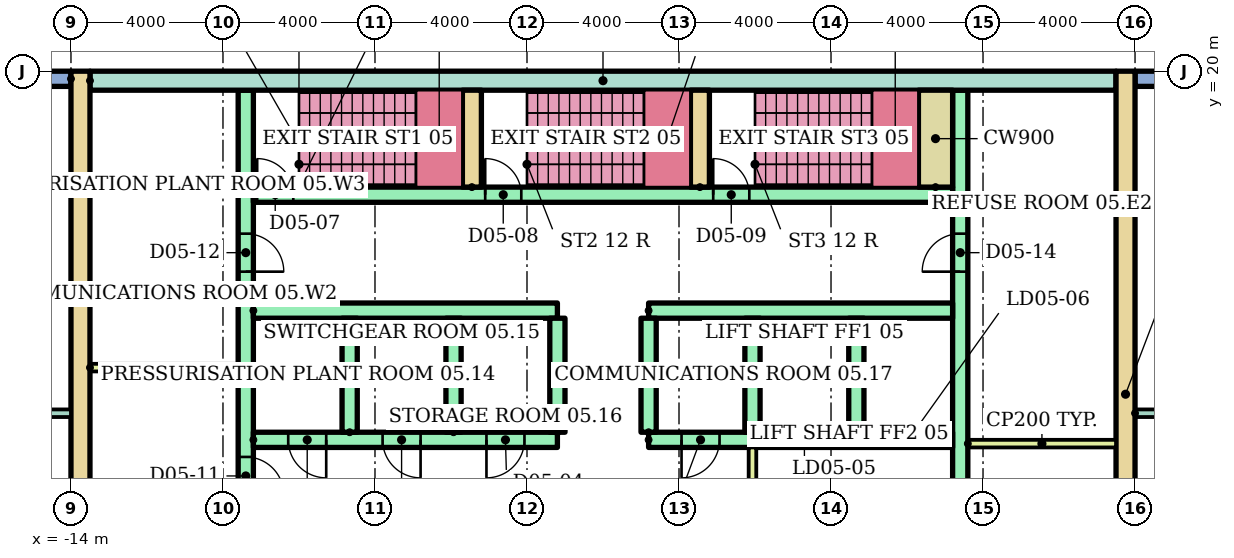
"""IFC4 building model, lengths in metres.
Left out: names, types, materials, properties, quantities, classifications, styles, units other than length and angle.
Written with IfcOpenShell. Run it as: python <this file> out.ifc"""

import sys

from ifc_helpers import new_model, si_unit, direction, frame, frame_2d, origin, place, context, subcontext, project, spatial, rectangle, extrude, element, fill, save


model = new_model("IFC4")
c1 = context("Model", 3, precision=1e-05, world=origin(), true_north=direction((0.0, 1.0)))
c2 = subcontext(c1, "Body", "Model", "MODEL_VIEW")
j1 = project(units=[si_unit("LENGTHUNIT", "METRE"), si_unit("PLANEANGLEUNIT", "RADIAN")], contexts=[c1])
p1 = place(None, origin())
s1 = spatial("IfcSite", under=j1, at=p1, CompositionType="ELEMENT")
p2 = place(p1, origin())
s2 = spatial("IfcBuilding", under=s1, at=p2, CompositionType="ELEMENT")
p3 = place(p2, frame((0.0, 0.0, 22.0)))
s3 = spatial("IfcBuildingStorey", under=s2, at=p3, CompositionType="ELEMENT", Elevation=22.0)
p4 = place(p3, frame((39.6, 19.8, 0.0), z_axis=(0.0, 0.0, 1.0), x_axis=(-1.0, 0.0, 0.0)))
e1 = element("IfcWall", 1, at=p4, inside=s3, PredefinedType="STANDARD", context=c2, shape_type="SweptSolid", body=[
    extrude(rectangle(XDim=25.6, YDim=0.4, at=frame_2d((12.8, 0.0))), origin(), (0.0, 0.0, 1.0), 3.7),
])
p5 = place(p4, frame((2.4, 0.0, 0.9)))
e2 = element("IfcOpeningElement", 2, at=p5, cuts=e1, PredefinedType="OPENING", context=c2, shape_type="SweptSolid", body=[
    extrude(rectangle(XDim=2.4, YDim=2.1, at=frame_2d((1.2, 1.05))), frame((0.0, 0.21, 0.0), z_axis=(0.0, -1.0, 0.0), x_axis=(1.0, 0.0, 0.0)), (0.0, 0.0, 1.0), 0.42),
])
p6 = place(p4, frame((18.135, 0.0, 0.9)))
e3 = element("IfcOpeningElement", 3, at=p6, cuts=e1, PredefinedType="OPENING", context=c2, shape_type="SweptSolid", body=[
    extrude(rectangle(XDim=2.4, YDim=2.1, at=frame_2d((1.2, 1.05))), frame((0.0, 0.21, 0.0), z_axis=(0.0, -1.0, 0.0), x_axis=(1.0, 0.0, 0.0)), (0.0, 0.0, 1.0), 0.42),
])
p7 = place(p4, frame((22.665, 0.0, 0.9)))
e4 = element("IfcOpeningElement", 4, at=p7, cuts=e1, PredefinedType="OPENING", context=c2, shape_type="SweptSolid", body=[
    extrude(rectangle(XDim=2.4, YDim=2.1, at=frame_2d((1.2, 1.05))), frame((0.0, 0.21, 0.0), z_axis=(0.0, -1.0, 0.0), x_axis=(1.0, 0.0, 0.0)), (0.0, 0.0, 1.0), 0.42),
])
p8 = place(p3, frame((-14.0, 19.8, 0.0), z_axis=(0.0, 0.0, 1.0), x_axis=(-1.0, 0.0, 0.0)))
e5 = element("IfcWall", 5, at=p8, inside=s3, PredefinedType="STANDARD", context=c2, shape_type="SweptSolid", body=[
    extrude(rectangle(XDim=25.6, YDim=0.4, at=frame_2d((12.8, 0.0))), origin(), (0.0, 0.0, 1.0), 3.7),
])
p9 = place(p8, frame((0.8, 0.0, 0.9)))
e6 = element("IfcOpeningElement", 6, at=p9, cuts=e5, PredefinedType="OPENING", context=c2, shape_type="SweptSolid", body=[
    extrude(rectangle(XDim=2.4, YDim=2.1, at=frame_2d((1.2, 1.05))), frame((0.0, 0.21, 0.0), z_axis=(0.0, -1.0, 0.0), x_axis=(1.0, 0.0, 0.0)), (0.0, 0.0, 1.0), 0.42),
])
p10 = place(p8, frame((4.535, 0.0, 0.9)))
e7 = element("IfcOpeningElement", 7, at=p10, cuts=e5, PredefinedType="OPENING", context=c2, shape_type="SweptSolid", body=[
    extrude(rectangle(XDim=2.4, YDim=2.1, at=frame_2d((1.2, 1.05))), frame((0.0, 0.21, 0.0), z_axis=(0.0, -1.0, 0.0), x_axis=(1.0, 0.0, 0.0)), (0.0, 0.0, 1.0), 0.42),
])
p11 = place(p8, frame((12.535, 0.0, 0.9)))
e8 = element("IfcOpeningElement", 8, at=p11, cuts=e5, PredefinedType="OPENING", context=c2, shape_type="SweptSolid", body=[
    extrude(rectangle(XDim=2.4, YDim=2.1, at=frame_2d((1.2, 1.05))), frame((0.0, 0.21, 0.0), z_axis=(0.0, -1.0, 0.0), x_axis=(1.0, 0.0, 0.0)), (0.0, 0.0, 1.0), 0.42),
])
p12 = place(p8, frame((20.8, 0.0, 0.9)))
e9 = element("IfcOpeningElement", 9, at=p12, cuts=e5, PredefinedType="OPENING", context=c2, shape_type="SweptSolid", body=[
    extrude(rectangle(XDim=2.4, YDim=2.1, at=frame_2d((1.2, 1.05))), frame((0.0, 0.21, 0.0), z_axis=(0.0, -1.0, 0.0), x_axis=(1.0, 0.0, 0.0)), (0.0, 0.0, 1.0), 0.42),
])
for number, where, z_axis, x_axis in (
    (10, (-13.75, 3.0, 0.0), (0.0, 0.0, 1.0), (0.0, 1.0, 0.0)),
    (11, (13.75, 3.0, 0.0), (0.0, 0.0, 1.0), (0.0, 1.0, 0.0)),
):
    element("IfcWall", number, at=place(p3, frame(where, z_axis=z_axis, x_axis=x_axis)), inside=s3, PredefinedType="SHEAR", context=c2, shape_type="SweptSolid", body=[
        extrude(rectangle(XDim=17.0, YDim=0.5, at=frame_2d((8.5, 0.0))), origin(), (0.0, 0.0, 1.0), 3.2),
    ])
p13 = place(p3, frame((-13.5, 19.75, 0.0)))
e12 = element("IfcWall", 12, at=p13, inside=s3, PredefinedType="SHEAR", context=c2, shape_type="SweptSolid", body=[
    extrude(rectangle(XDim=27.0, YDim=0.5, at=frame_2d((13.5, 0.0))), origin(), (0.0, 0.0, 1.0), 3.2),
])
p14 = place(p3, frame((-9.4, 6.8, 0.0), z_axis=(0.0, 0.0, 1.0), x_axis=(0.0, 1.0, 0.0)))
e13 = element("IfcWall", 13, at=p14, inside=s3, PredefinedType="SHEAR", context=c2, shape_type="SweptSolid", body=[
    extrude(rectangle(XDim=12.7, YDim=0.4, at=frame_2d((6.35, 0.0))), origin(), (0.0, 0.0, 1.0), 3.2),
])
p15 = place(p14, frame((0.3, 0.0, 0.0)))
e14 = element("IfcOpeningElement", 14, at=p15, cuts=e13, PredefinedType="OPENING", context=c2, shape_type="SweptSolid", body=[
    extrude(rectangle(XDim=1.0, YDim=2.1, at=frame_2d((0.5, 1.05))), frame((0.0, 0.21, 0.0), z_axis=(0.0, -1.0, 0.0), x_axis=(1.0, 0.0, 0.0)), (0.0, 0.0, 1.0), 0.42),
])
p16 = place(p14, frame((2.05, 0.0, 0.0)))
e15 = element("IfcOpeningElement", 15, at=p16, cuts=e13, PredefinedType="OPENING", context=c2, shape_type="SweptSolid", body=[
    extrude(rectangle(XDim=1.0, YDim=2.1, at=frame_2d((0.5, 1.05))), frame((0.0, 0.21, 0.0), z_axis=(0.0, -1.0, 0.0), x_axis=(1.0, 0.0, 0.0)), (0.0, 0.0, 1.0), 0.42),
])
p17 = place(p14, frame((7.925, 0.0, 0.0)))
e16 = element("IfcOpeningElement", 16, at=p17, cuts=e13, PredefinedType="OPENING", context=c2, shape_type="SweptSolid", body=[
    extrude(rectangle(XDim=1.0, YDim=2.1, at=frame_2d((0.5, 1.05))), frame((0.0, 0.21, 0.0), z_axis=(0.0, -1.0, 0.0), x_axis=(1.0, 0.0, 0.0)), (0.0, 0.0, 1.0), 0.42),
])
p18 = place(p3, frame((9.4, 6.8, 0.0), z_axis=(0.0, 0.0, 1.0), x_axis=(0.0, 1.0, 0.0)))
e17 = element("IfcWall", 17, at=p18, inside=s3, PredefinedType="SHEAR", context=c2, shape_type="SweptSolid", body=[
    extrude(rectangle(XDim=12.7, YDim=0.4, at=frame_2d((6.35, 0.0))), origin(), (0.0, 0.0, 1.0), 3.2),
])
p19 = place(p18, frame((1.15, 0.0, 0.0)))
e18 = element("IfcOpeningElement", 18, at=p19, cuts=e17, PredefinedType="OPENING", context=c2, shape_type="SweptSolid", body=[
    extrude(rectangle(XDim=1.0, YDim=2.1, at=frame_2d((0.5, 1.05))), frame((0.0, 0.21, 0.0), z_axis=(0.0, -1.0, 0.0), x_axis=(1.0, 0.0, 0.0)), (0.0, 0.0, 1.0), 0.42),
])
p20 = place(p18, frame((7.925, 0.0, 0.0)))
e19 = element("IfcOpeningElement", 19, at=p20, cuts=e17, PredefinedType="OPENING", context=c2, shape_type="SweptSolid", body=[
    extrude(rectangle(XDim=1.0, YDim=2.1, at=frame_2d((0.5, 1.05))), frame((0.0, 0.21, 0.0), z_axis=(0.0, -1.0, 0.0), x_axis=(1.0, 0.0, 0.0)), (0.0, 0.0, 1.0), 0.42),
])
p21 = place(p3, frame((-9.2, 10.3, 0.0)))
e20 = element("IfcWall", 20, at=p21, inside=s3, PredefinedType="SHEAR", context=c2, shape_type="SweptSolid", body=[
    extrude(rectangle(XDim=8.0, YDim=0.4, at=frame_2d((4.0, 0.0))), origin(), (0.0, 0.0, 1.0), 3.2),
])
p22 = place(p21, frame((0.917, 0.0, 0.0)))
e21 = element("IfcOpeningElement", 21, at=p22, cuts=e20, PredefinedType="OPENING", context=c2, shape_type="SweptSolid", body=[
    extrude(rectangle(XDim=1.0, YDim=2.1, at=frame_2d((0.5, 1.05))), frame((0.0, 0.21, 0.0), z_axis=(0.0, -1.0, 0.0), x_axis=(1.0, 0.0, 0.0)), (0.0, 0.0, 1.0), 0.42),
])
p23 = place(p21, frame((3.4, 0.0, 0.0)))
e22 = element("IfcOpeningElement", 22, at=p23, cuts=e20, PredefinedType="OPENING", context=c2, shape_type="SweptSolid", body=[
    extrude(rectangle(XDim=1.0, YDim=2.1, at=frame_2d((0.5, 1.05))), frame((0.0, 0.21, 0.0), z_axis=(0.0, -1.0, 0.0), x_axis=(1.0, 0.0, 0.0)), (0.0, 0.0, 1.0), 0.42),
])
p24 = place(p21, frame((6.133, 0.0, 0.0)))
e23 = element("IfcOpeningElement", 23, at=p24, cuts=e20, PredefinedType="OPENING", context=c2, shape_type="SweptSolid", body=[
    extrude(rectangle(XDim=1.0, YDim=2.1, at=frame_2d((0.5, 1.05))), frame((0.0, 0.21, 0.0), z_axis=(0.0, -1.0, 0.0), x_axis=(1.0, 0.0, 0.0)), (0.0, 0.0, 1.0), 0.42),
])
p25 = place(p3, frame((-9.2, 13.7, 0.0)))
e24 = element("IfcWall", 24, at=p25, inside=s3, PredefinedType="SHEAR", context=c2, shape_type="SweptSolid", body=[
    extrude(rectangle(XDim=8.0, YDim=0.4, at=frame_2d((4.0, 0.0))), origin(), (0.0, 0.0, 1.0), 3.2),
])
p26 = place(p3, frame((1.2, 10.3, 0.0)))
e25 = element("IfcWall", 25, at=p26, inside=s3, PredefinedType="SHEAR", context=c2, shape_type="SweptSolid", body=[
    extrude(rectangle(XDim=8.0, YDim=0.4, at=frame_2d((4.0, 0.0))), origin(), (0.0, 0.0, 1.0), 3.2),
])
p27 = place(p26, frame((3.55, 0.0, 0.0)))
e26 = element("IfcOpeningElement", 26, at=p27, cuts=e25, PredefinedType="OPENING", context=c2, shape_type="SweptSolid", body=[
    extrude(rectangle(XDim=1.1, YDim=2.1, at=frame_2d((0.55, 1.05))), frame((0.0, 0.21, 0.0), z_axis=(0.0, -1.0, 0.0), x_axis=(1.0, 0.0, 0.0)), (0.0, 0.0, 1.0), 0.42),
])
p28 = place(p26, frame((6.283, 0.0, 0.0)))
e27 = element("IfcOpeningElement", 27, at=p28, cuts=e25, PredefinedType="OPENING", context=c2, shape_type="SweptSolid", body=[
    extrude(rectangle(XDim=1.1, YDim=2.1, at=frame_2d((0.55, 1.05))), frame((0.0, 0.21, 0.0), z_axis=(0.0, -1.0, 0.0), x_axis=(1.0, 0.0, 0.0)), (0.0, 0.0, 1.0), 0.42),
])
p29 = place(p26, frame((0.867, 0.0, 0.0)))
e28 = element("IfcOpeningElement", 28, at=p29, cuts=e25, PredefinedType="OPENING", context=c2, shape_type="SweptSolid", body=[
    extrude(rectangle(XDim=1.0, YDim=2.1, at=frame_2d((0.5, 1.05))), frame((0.0, 0.21, 0.0), z_axis=(0.0, -1.0, 0.0), x_axis=(1.0, 0.0, 0.0)), (0.0, 0.0, 1.0), 0.42),
])
p30 = place(p3, frame((1.2, 13.7, 0.0)))
e29 = element("IfcWall", 29, at=p30, inside=s3, PredefinedType="SHEAR", context=c2, shape_type="SweptSolid", body=[
    extrude(rectangle(XDim=8.0, YDim=0.4, at=frame_2d((4.0, 0.0))), origin(), (0.0, 0.0, 1.0), 3.2),
])
for number, where, z_axis, x_axis in (
    (30, (-6.667, 10.5, 0.0), (0.0, 0.0, 1.0), (0.0, 1.0, 0.0)),
    (31, (-3.933, 10.5, 0.0), (0.0, 0.0, 1.0), (0.0, 1.0, 0.0)),
    (32, (-1.2, 10.5, 0.0), (0.0, 0.0, 1.0), (0.0, 1.0, 0.0)),
    (33, (1.2, 10.5, 0.0), (0.0, 0.0, 1.0), (0.0, 1.0, 0.0)),
    (34, (3.933, 10.5, 0.0), (0.0, 0.0, 1.0), (0.0, 1.0, 0.0)),
    (35, (6.667, 10.5, 0.0), (0.0, 0.0, 1.0), (0.0, 1.0, 0.0)),
):
    element("IfcWall", number, at=place(p3, frame(where, z_axis=z_axis, x_axis=x_axis)), inside=s3, PredefinedType="SHEAR", context=c2, shape_type="SweptSolid", body=[
        extrude(rectangle(XDim=3.0, YDim=0.4, at=frame_2d((1.5, 0.0))), origin(), (0.0, 0.0, 1.0), 3.2),
    ])
p31 = place(p3, frame((3.933, 6.8, 0.0), z_axis=(0.0, 0.0, 1.0), x_axis=(0.0, 1.0, 0.0)))
e36 = element("IfcWall", 36, at=p31, inside=s3, PredefinedType="PARTITIONING", context=c2, shape_type="SweptSolid", body=[
    extrude(rectangle(XDim=3.3, YDim=0.2, at=frame_2d((1.65, 0.0))), origin(), (0.0, 0.0, 1.0), 3.2),
])
p32 = place(p31, frame((1.1, 0.0, 0.0)))
e37 = element("IfcOpeningElement", 37, at=p32, cuts=e36, PredefinedType="OPENING", context=c2, shape_type="SweptSolid", body=[
    extrude(rectangle(XDim=1.1, YDim=2.1, at=frame_2d((0.55, 1.05))), frame((0.0, 0.11, 0.0), z_axis=(0.0, -1.0, 0.0), x_axis=(1.0, 0.0, 0.0)), (0.0, 0.0, 1.0), 0.22),
])
p33 = place(p3, frame((-9.2, 16.75, 0.0)))
e38 = element("IfcWall", 38, at=p33, inside=s3, PredefinedType="SHEAR", context=c2, shape_type="SweptSolid", body=[
    extrude(rectangle(XDim=18.4, YDim=0.4, at=frame_2d((9.2, 0.0))), origin(), (0.0, 0.0, 1.0), 3.2),
])
p34 = place(p33, frame((0.1, 0.0, 0.0)))
e39 = element("IfcOpeningElement", 39, at=p34, cuts=e38, PredefinedType="OPENING", context=c2, shape_type="SweptSolid", body=[
    extrude(rectangle(XDim=0.95, YDim=2.1, at=frame_2d((0.475, 1.05))), frame((0.0, 0.21, 0.0), z_axis=(0.0, -1.0, 0.0), x_axis=(1.0, 0.0, 0.0)), (0.0, 0.0, 1.0), 0.42),
])
p35 = place(p33, frame((6.1, 0.0, 0.0)))
e40 = element("IfcOpeningElement", 40, at=p35, cuts=e38, PredefinedType="OPENING", context=c2, shape_type="SweptSolid", body=[
    extrude(rectangle(XDim=0.95, YDim=2.1, at=frame_2d((0.475, 1.05))), frame((0.0, 0.21, 0.0), z_axis=(0.0, -1.0, 0.0), x_axis=(1.0, 0.0, 0.0)), (0.0, 0.0, 1.0), 0.42),
])
p36 = place(p33, frame((12.1, 0.0, 0.0)))
e41 = element("IfcOpeningElement", 41, at=p36, cuts=e38, PredefinedType="OPENING", context=c2, shape_type="SweptSolid", body=[
    extrude(rectangle(XDim=0.95, YDim=2.1, at=frame_2d((0.475, 1.05))), frame((0.0, 0.21, 0.0), z_axis=(0.0, -1.0, 0.0), x_axis=(1.0, 0.0, 0.0)), (0.0, 0.0, 1.0), 0.42),
])
for number, where, z_axis, x_axis in (
    (42, (-3.45, 16.95, 0.0), (0.0, 0.0, 1.0), (0.0, 1.0, 0.0)),
    (43, (2.55, 16.95, 0.0), (0.0, 0.0, 1.0), (0.0, 1.0, 0.0)),
):
    element("IfcWall", number, at=place(p3, frame(where, z_axis=z_axis, x_axis=x_axis)), inside=s3, PredefinedType="SHEAR", context=c2, shape_type="SweptSolid", body=[
        extrude(rectangle(XDim=2.55, YDim=0.5, at=frame_2d((1.275, 0.0))), origin(), (0.0, 0.0, 1.0), 3.2),
    ])
p37 = place(p3, frame((8.75, 16.95, 0.0), z_axis=(0.0, 0.0, 1.0), x_axis=(0.0, 1.0, 0.0)))
e44 = element("IfcWall", 44, at=p37, inside=s3, PredefinedType="SHEAR", context=c2, shape_type="SweptSolid", body=[
    extrude(rectangle(XDim=2.55, YDim=0.9, at=frame_2d((1.275, 0.0))), origin(), (0.0, 0.0, 1.0), 3.2),
])
for number, where in (
    (45, (-13.5, 12.2, 0.0)),
    (46, (9.6, 10.2, 0.0)),
):
    element("IfcWall", number, at=place(p3, frame(where)), inside=s3, PredefinedType="PARTITIONING", context=c2, shape_type="SweptSolid", body=[
        extrude(rectangle(XDim=3.9, YDim=0.2, at=frame_2d((1.95, 0.0))), origin(), (0.0, 0.0, 1.0), 3.2),
    ])
p38 = place(p3, frame((-21.5, 11.0, 0.0)))
e47 = element("IfcWall", 47, at=p38, inside=s3, PredefinedType="PARTITIONING", context=c2, shape_type="SweptSolid", body=[
    extrude(rectangle(XDim=7.5, YDim=0.2, at=frame_2d((3.75, 0.0))), origin(), (0.0, 0.0, 1.0), 3.2),
])
p39 = place(p38, frame((0.35, 0.0, 0.0)))
e48 = element("IfcOpeningElement", 48, at=p39, cuts=e47, PredefinedType="OPENING", context=c2, shape_type="SweptSolid", body=[
    extrude(rectangle(XDim=1.0, YDim=2.1, at=frame_2d((0.5, 1.05))), frame((0.0, 0.11, 0.0), z_axis=(0.0, -1.0, 0.0), x_axis=(1.0, 0.0, 0.0)), (0.0, 0.0, 1.0), 0.22),
])
p40 = place(p38, frame((4.36, 0.0, 0.0)))
e49 = element("IfcOpeningElement", 49, at=p40, cuts=e47, PredefinedType="OPENING", context=c2, shape_type="SweptSolid", body=[
    extrude(rectangle(XDim=1.0, YDim=2.1, at=frame_2d((0.5, 1.05))), frame((0.0, 0.11, 0.0), z_axis=(0.0, -1.0, 0.0), x_axis=(1.0, 0.0, 0.0)), (0.0, 0.0, 1.0), 0.22),
])
p41 = place(p3, frame((14.0, 11.0, 0.0)))
e50 = element("IfcWall", 50, at=p41, inside=s3, PredefinedType="PARTITIONING", context=c2, shape_type="SweptSolid", body=[
    extrude(rectangle(XDim=3.5, YDim=0.2, at=frame_2d((1.75, 0.0))), origin(), (0.0, 0.0, 1.0), 3.2),
])
p42 = place(p27, origin())
e51 = element("IfcDoor", 51, at=p42, inside=s3, OperationType="SLIDING_TO_LEFT", PredefinedType="DOOR", context=c2, shape_type="SweptSolid", body=[
    extrude(rectangle(XDim=1.1, YDim=2.1, at=frame_2d((0.55, 1.05))), frame((0.0, 0.025, 0.0), z_axis=(0.0, -1.0, 0.0), x_axis=(1.0, 0.0, 0.0)), (0.0, 0.0, 1.0), 0.05),
])
fill(e26, e51)
p43 = place(p28, origin())
e52 = element("IfcDoor", 52, at=p43, inside=s3, OperationType="SLIDING_TO_LEFT", PredefinedType="DOOR", context=c2, shape_type="SweptSolid", body=[
    extrude(rectangle(XDim=1.1, YDim=2.1, at=frame_2d((0.55, 1.05))), frame((0.0, 0.025, 0.0), z_axis=(0.0, -1.0, 0.0), x_axis=(1.0, 0.0, 0.0)), (0.0, 0.0, 1.0), 0.05),
])
fill(e27, e52)
p44 = place(p22, frame((1.0, 0.0, 0.0), z_axis=(0.0, 0.0, 1.0), x_axis=(-1.0, 0.0, 0.0)))
e53 = element("IfcDoor", 53, at=p44, inside=s3, OperationType="SINGLE_SWING_RIGHT", PredefinedType="DOOR", context=c2, shape_type="SweptSolid", body=[
    extrude(rectangle(XDim=1.0, YDim=2.1, at=frame_2d((0.5, 1.05))), frame((0.0, 0.025, 0.0), z_axis=(0.0, -1.0, 0.0), x_axis=(1.0, 0.0, 0.0)), (0.0, 0.0, 1.0), 0.05),
])
fill(e21, e53)
p45 = place(p23, frame((1.0, 0.0, 0.0), z_axis=(0.0, 0.0, 1.0), x_axis=(-1.0, 0.0, 0.0)))
e54 = element("IfcDoor", 54, at=p45, inside=s3, OperationType="SINGLE_SWING_RIGHT", PredefinedType="DOOR", context=c2, shape_type="SweptSolid", body=[
    extrude(rectangle(XDim=1.0, YDim=2.1, at=frame_2d((0.5, 1.05))), frame((0.0, 0.025, 0.0), z_axis=(0.0, -1.0, 0.0), x_axis=(1.0, 0.0, 0.0)), (0.0, 0.0, 1.0), 0.05),
])
fill(e22, e54)
p46 = place(p24, frame((1.0, 0.0, 0.0), z_axis=(0.0, 0.0, 1.0), x_axis=(-1.0, 0.0, 0.0)))
e55 = element("IfcDoor", 55, at=p46, inside=s3, OperationType="SINGLE_SWING_LEFT", PredefinedType="DOOR", context=c2, shape_type="SweptSolid", body=[
    extrude(rectangle(XDim=1.0, YDim=2.1, at=frame_2d((0.5, 1.05))), frame((0.0, 0.025, 0.0), z_axis=(0.0, -1.0, 0.0), x_axis=(1.0, 0.0, 0.0)), (0.0, 0.0, 1.0), 0.05),
])
fill(e23, e55)
p47 = place(p29, frame((1.0, 0.0, 0.0), z_axis=(0.0, 0.0, 1.0), x_axis=(-1.0, 0.0, 0.0)))
e56 = element("IfcDoor", 56, at=p47, inside=s3, OperationType="SINGLE_SWING_LEFT", PredefinedType="DOOR", context=c2, shape_type="SweptSolid", body=[
    extrude(rectangle(XDim=1.0, YDim=2.1, at=frame_2d((0.5, 1.05))), frame((0.0, 0.025, 0.0), z_axis=(0.0, -1.0, 0.0), x_axis=(1.0, 0.0, 0.0)), (0.0, 0.0, 1.0), 0.05),
])
fill(e28, e56)
p48 = place(p34, origin())
e57 = element("IfcDoor", 57, at=p48, inside=s3, OperationType="SINGLE_SWING_LEFT", PredefinedType="DOOR", context=c2, shape_type="SweptSolid", body=[
    extrude(rectangle(XDim=0.95, YDim=2.1, at=frame_2d((0.475, 1.05))), frame((0.0, 0.025, 0.0), z_axis=(0.0, -1.0, 0.0), x_axis=(1.0, 0.0, 0.0)), (0.0, 0.0, 1.0), 0.05),
])
fill(e39, e57)
p49 = place(p35, origin())
e58 = element("IfcDoor", 58, at=p49, inside=s3, OperationType="SINGLE_SWING_LEFT", PredefinedType="DOOR", context=c2, shape_type="SweptSolid", body=[
    extrude(rectangle(XDim=0.95, YDim=2.1, at=frame_2d((0.475, 1.05))), frame((0.0, 0.025, 0.0), z_axis=(0.0, -1.0, 0.0), x_axis=(1.0, 0.0, 0.0)), (0.0, 0.0, 1.0), 0.05),
])
fill(e40, e58)
p50 = place(p36, origin())
e59 = element("IfcDoor", 59, at=p50, inside=s3, OperationType="SINGLE_SWING_LEFT", PredefinedType="DOOR", context=c2, shape_type="SweptSolid", body=[
    extrude(rectangle(XDim=0.95, YDim=2.1, at=frame_2d((0.475, 1.05))), frame((0.0, 0.025, 0.0), z_axis=(0.0, -1.0, 0.0), x_axis=(1.0, 0.0, 0.0)), (0.0, 0.0, 1.0), 0.05),
])
fill(e41, e59)
p51 = place(p16, frame((1.0, 0.0, 0.0), z_axis=(0.0, 0.0, 1.0), x_axis=(-1.0, 0.0, 0.0)))
e60 = element("IfcDoor", 60, at=p51, inside=s3, OperationType="SINGLE_SWING_LEFT", PredefinedType="DOOR", context=c2, shape_type="SweptSolid", body=[
    extrude(rectangle(XDim=1.0, YDim=2.1, at=frame_2d((0.5, 1.05))), frame((0.0, 0.025, 0.0), z_axis=(0.0, -1.0, 0.0), x_axis=(1.0, 0.0, 0.0)), (0.0, 0.0, 1.0), 0.05),
])
fill(e15, e60)
p52 = place(p17, frame((1.0, 0.0, 0.0), z_axis=(0.0, 0.0, 1.0), x_axis=(-1.0, 0.0, 0.0)))
e61 = element("IfcDoor", 61, at=p52, inside=s3, OperationType="SINGLE_SWING_LEFT", PredefinedType="DOOR", context=c2, shape_type="SweptSolid", body=[
    extrude(rectangle(XDim=1.0, YDim=2.1, at=frame_2d((0.5, 1.05))), frame((0.0, 0.025, 0.0), z_axis=(0.0, -1.0, 0.0), x_axis=(1.0, 0.0, 0.0)), (0.0, 0.0, 1.0), 0.05),
])
fill(e16, e61)
p53 = place(p20, origin())
e62 = element("IfcDoor", 62, at=p53, inside=s3, OperationType="SINGLE_SWING_LEFT", PredefinedType="DOOR", context=c2, shape_type="SweptSolid", body=[
    extrude(rectangle(XDim=1.0, YDim=2.1, at=frame_2d((0.5, 1.05))), frame((0.0, 0.025, 0.0), z_axis=(0.0, -1.0, 0.0), x_axis=(1.0, 0.0, 0.0)), (0.0, 0.0, 1.0), 0.05),
])
fill(e19, e62)
save(model, sys.argv[1])
